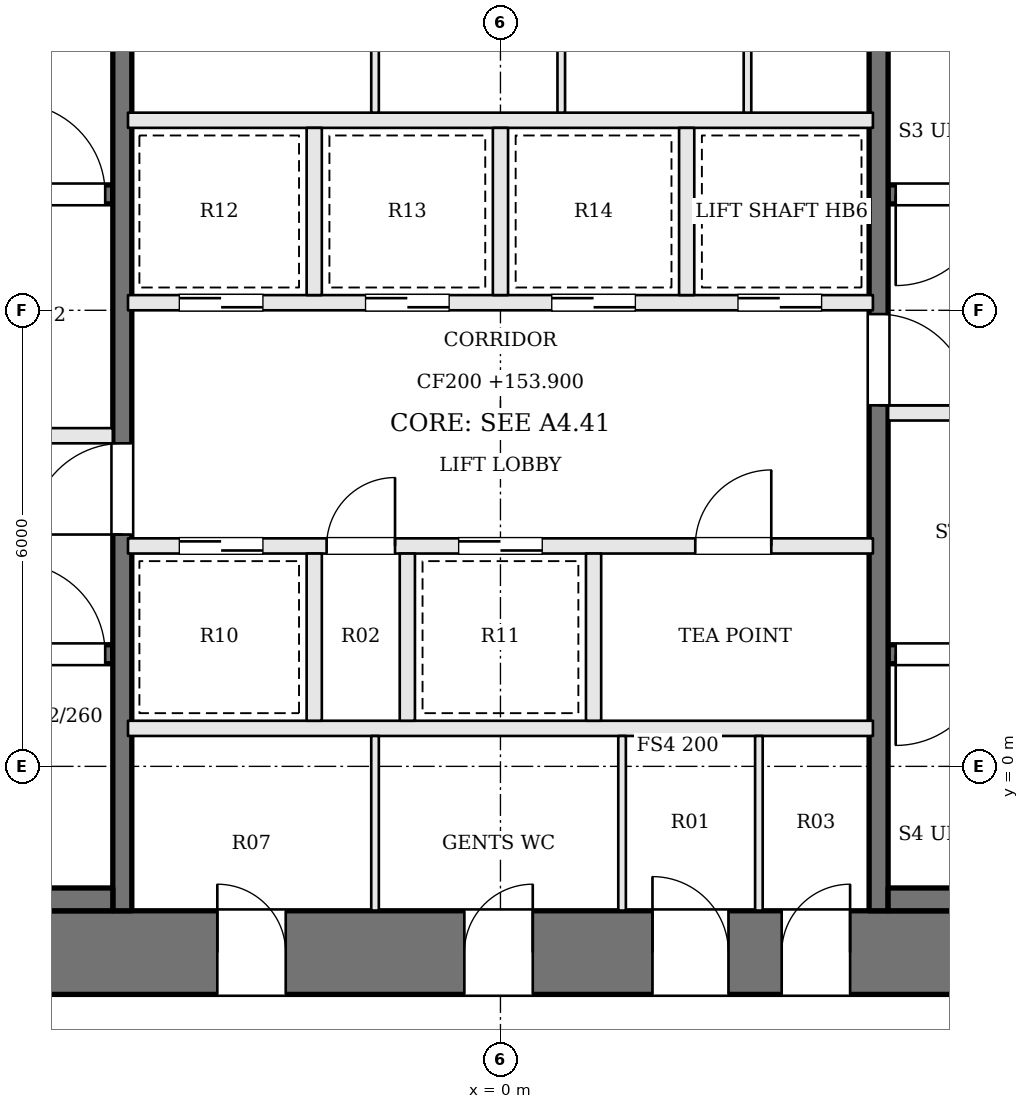
"""IFC4 building model, lengths in metres.
Left out: names, types, materials, properties, quantities, classifications, styles, units other than length and angle.
Written with IfcOpenShell. Run it as: python <this file> out.ifc"""

import sys

from ifc_helpers import new_model, si_unit, direction, frame, frame_2d, origin, place, context, subcontext, project, spatial, rectangle, extrude, element, fill, save


model = new_model("IFC4")
c1 = context("Model", 3, precision=1e-05, world=origin(), true_north=direction((0.0, 1.0)))
c2 = subcontext(c1, "Body", "Model", "MODEL_VIEW")
j1 = project(units=[si_unit("LENGTHUNIT", "METRE"), si_unit("PLANEANGLEUNIT", "RADIAN")], contexts=[c1])
p1 = place(None, origin())
s1 = spatial("IfcSite", under=j1, at=p1, CompositionType="ELEMENT")
p2 = place(p1, origin())
s2 = spatial("IfcBuilding", under=s1, at=p2, CompositionType="ELEMENT")
p3 = place(p2, frame((0.0, 0.0, 153.9)))
s3 = spatial("IfcBuildingStorey", under=s2, at=p3, CompositionType="ELEMENT", Elevation=153.9)
p4 = place(p3, frame((-13.0, -2.45, 0.0), z_axis=(0.0, 0.0, 1.0), x_axis=(1.0, 0.0, 0.0)))
e1 = element("IfcWall", 1, at=p4, inside=s3, PredefinedType="SHEAR", context=c2, shape_type="SweptSolid", body=[
    extrude(rectangle(XDim=26.0, YDim=1.1, at=frame_2d((13.0, 0.0))), origin(), (0.0, 0.0, 1.0), 3.9),
])
p5 = place(p4, frame((9.275, 0.0, 0.0)))
e2 = element("IfcOpeningElement", 2, at=p5, cuts=e1, PredefinedType="OPENING", context=c2, shape_type="SweptSolid", body=[
    extrude(rectangle(XDim=0.9, YDim=2.1, at=frame_2d((0.45, 1.05))), frame((0.0, 0.56, 0.0), z_axis=(0.0, -1.0, 0.0), x_axis=(1.0, 0.0, 0.0)), (0.0, 0.0, 1.0), 1.12),
])
p6 = place(p4, frame((12.525, 0.0, 0.0)))
e3 = element("IfcOpeningElement", 3, at=p6, cuts=e1, PredefinedType="OPENING", context=c2, shape_type="SweptSolid", body=[
    extrude(rectangle(XDim=0.9, YDim=2.1, at=frame_2d((0.45, 1.05))), frame((0.0, 0.56, 0.0), z_axis=(0.0, -1.0, 0.0), x_axis=(1.0, 0.0, 0.0)), (0.0, 0.0, 1.0), 1.12),
])
p7 = place(p4, frame((15.0, 0.0, 0.0)))
e4 = element("IfcOpeningElement", 4, at=p7, cuts=e1, PredefinedType="OPENING", context=c2, shape_type="SweptSolid", body=[
    extrude(rectangle(XDim=1.0, YDim=2.1, at=frame_2d((0.5, 1.05))), frame((0.0, 0.56, 0.0), z_axis=(0.0, -1.0, 0.0), x_axis=(1.0, 0.0, 0.0)), (0.0, 0.0, 1.0), 1.12),
])
p8 = place(p4, frame((16.7, 0.0, 0.0)))
e5 = element("IfcOpeningElement", 5, at=p8, cuts=e1, PredefinedType="OPENING", context=c2, shape_type="SweptSolid", body=[
    extrude(rectangle(XDim=0.9, YDim=2.1, at=frame_2d((0.45, 1.05))), frame((0.0, 0.56, 0.0), z_axis=(0.0, -1.0, 0.0), x_axis=(1.0, 0.0, 0.0)), (0.0, 0.0, 1.0), 1.12),
])
p9 = place(p3, frame((-11.9, 1.475, 0.0), z_axis=(0.0, 0.0, 1.0), x_axis=(1.0, 0.0, 0.0)))
e6 = element("IfcWall", 6, at=p9, inside=s3, PredefinedType="SOLIDWALL", context=c2, shape_type="SweptSolid", body=[
    extrude(rectangle(XDim=6.8, YDim=0.25, at=frame_2d((3.4, 0.0))), origin(), (0.0, 0.0, 1.0), 3.7),
])
p10 = place(p9, frame((5.5, 0.0, 0.0)))
e7 = element("IfcOpeningElement", 7, at=p10, cuts=e6, PredefinedType="OPENING", context=c2, shape_type="SweptSolid", body=[
    extrude(rectangle(XDim=1.2, YDim=2.1, at=frame_2d((0.6, 1.05))), frame((0.0, 0.135, 0.0), z_axis=(0.0, -1.0, 0.0), x_axis=(1.0, 0.0, 0.0)), (0.0, 0.0, 1.0), 0.27),
])
p11 = place(p3, frame((11.9, 7.525, 0.0), z_axis=(0.0, 0.0, 1.0), x_axis=(-1.0, 0.0, 0.0)))
e8 = element("IfcWall", 8, at=p11, inside=s3, PredefinedType="SOLIDWALL", context=c2, shape_type="SweptSolid", body=[
    extrude(rectangle(XDim=6.8, YDim=0.25, at=frame_2d((3.4, 0.0))), origin(), (0.0, 0.0, 1.0), 3.7),
])
p12 = place(p11, frame((5.5, 0.0, 0.0)))
e9 = element("IfcOpeningElement", 9, at=p12, cuts=e8, PredefinedType="OPENING", context=c2, shape_type="SweptSolid", body=[
    extrude(rectangle(XDim=1.2, YDim=2.1, at=frame_2d((0.6, 1.05))), frame((0.0, 0.135, 0.0), z_axis=(0.0, -1.0, 0.0), x_axis=(1.0, 0.0, 0.0)), (0.0, 0.0, 1.0), 0.27),
])
p13 = place(p3, frame((-11.9, 4.35, 0.0), z_axis=(0.0, 0.0, 1.0), x_axis=(1.0, 0.0, 0.0)))
e10 = element("IfcWall", 10, at=p13, inside=s3, PredefinedType="SOLIDWALL", context=c2, shape_type="SweptSolid", body=[
    extrude(rectangle(XDim=6.8, YDim=0.2, at=frame_2d((3.4, 0.0))), origin(), (0.0, 0.0, 1.0), 3.7),
])
p14 = place(p13, frame((4.1, 0.0, 0.0)))
e11 = element("IfcOpeningElement", 11, at=p14, cuts=e10, PredefinedType="OPENING", context=c2, shape_type="SweptSolid", body=[
    extrude(rectangle(XDim=1.2, YDim=2.1, at=frame_2d((0.6, 1.05))), frame((0.0, 0.11, 0.0), z_axis=(0.0, -1.0, 0.0), x_axis=(1.0, 0.0, 0.0)), (0.0, 0.0, 1.0), 0.22),
])
p15 = place(p13, frame((0.8, 0.0, 0.0)))
e12 = element("IfcOpeningElement", 12, at=p15, cuts=e10, PredefinedType="OPENING", context=c2, shape_type="SweptSolid", body=[
    extrude(rectangle(XDim=1.2, YDim=2.1, at=frame_2d((0.6, 1.05))), frame((0.0, 0.11, 0.0), z_axis=(0.0, -1.0, 0.0), x_axis=(1.0, 0.0, 0.0)), (0.0, 0.0, 1.0), 0.22),
])
p16 = place(p3, frame((11.9, 4.65, 0.0), z_axis=(0.0, 0.0, 1.0), x_axis=(-1.0, 0.0, 0.0)))
e13 = element("IfcWall", 13, at=p16, inside=s3, PredefinedType="SOLIDWALL", context=c2, shape_type="SweptSolid", body=[
    extrude(rectangle(XDim=6.8, YDim=0.2, at=frame_2d((3.4, 0.0))), origin(), (0.0, 0.0, 1.0), 3.7),
])
p17 = place(p16, frame((4.1, 0.0, 0.0)))
e14 = element("IfcOpeningElement", 14, at=p17, cuts=e13, PredefinedType="OPENING", context=c2, shape_type="SweptSolid", body=[
    extrude(rectangle(XDim=1.2, YDim=2.1, at=frame_2d((0.6, 1.05))), frame((0.0, 0.11, 0.0), z_axis=(0.0, -1.0, 0.0), x_axis=(1.0, 0.0, 0.0)), (0.0, 0.0, 1.0), 0.22),
])
p18 = place(p16, frame((0.8, 0.0, 0.0)))
e15 = element("IfcOpeningElement", 15, at=p18, cuts=e13, PredefinedType="OPENING", context=c2, shape_type="SweptSolid", body=[
    extrude(rectangle(XDim=1.2, YDim=2.1, at=frame_2d((0.6, 1.05))), frame((0.0, 0.11, 0.0), z_axis=(0.0, -1.0, 0.0), x_axis=(1.0, 0.0, 0.0)), (0.0, 0.0, 1.0), 0.22),
])
p19 = place(p3, frame((-11.9, 7.525, 0.0), z_axis=(0.0, 0.0, 1.0), x_axis=(1.0, 0.0, 0.0)))
e16 = element("IfcWall", 16, at=p19, inside=s3, PredefinedType="SOLIDWALL", context=c2, shape_type="SweptSolid", body=[
    extrude(rectangle(XDim=6.8, YDim=0.25, at=frame_2d((3.4, 0.0))), origin(), (0.0, 0.0, 1.0), 3.7),
])
p20 = place(p19, frame((5.5, 0.0, 0.0)))
e17 = element("IfcOpeningElement", 17, at=p20, cuts=e16, PredefinedType="OPENING", context=c2, shape_type="SweptSolid", body=[
    extrude(rectangle(XDim=1.2, YDim=2.1, at=frame_2d((0.6, 1.05))), frame((0.0, 0.135, 0.0), z_axis=(0.0, -1.0, 0.0), x_axis=(1.0, 0.0, 0.0)), (0.0, 0.0, 1.0), 0.27),
])
p21 = place(p3, frame((11.9, 1.475, 0.0), z_axis=(0.0, 0.0, 1.0), x_axis=(-1.0, 0.0, 0.0)))
e18 = element("IfcWall", 18, at=p21, inside=s3, PredefinedType="SOLIDWALL", context=c2, shape_type="SweptSolid", body=[
    extrude(rectangle(XDim=6.8, YDim=0.25, at=frame_2d((3.4, 0.0))), origin(), (0.0, 0.0, 1.0), 3.7),
])
p22 = place(p21, frame((5.5, 0.0, 0.0)))
e19 = element("IfcOpeningElement", 19, at=p22, cuts=e18, PredefinedType="OPENING", context=c2, shape_type="SweptSolid", body=[
    extrude(rectangle(XDim=1.2, YDim=2.1, at=frame_2d((0.6, 1.05))), frame((0.0, 0.135, 0.0), z_axis=(0.0, -1.0, 0.0), x_axis=(1.0, 0.0, 0.0)), (0.0, 0.0, 1.0), 0.27),
])
p23 = place(p3, frame((-4.975, -1.9, 0.0), z_axis=(0.0, 0.0, 1.0), x_axis=(0.0, 1.0, 0.0)))
e20 = element("IfcWall", 20, at=p23, inside=s3, PredefinedType="SOLIDWALL", context=c2, shape_type="SweptSolid", body=[
    extrude(rectangle(XDim=12.8, YDim=0.25, at=frame_2d((6.4, 0.0))), origin(), (0.0, 0.0, 1.0), 3.7),
])
p24 = place(p23, frame((4.95, 0.0, 0.0)))
e21 = element("IfcOpeningElement", 21, at=p24, cuts=e20, PredefinedType="OPENING", context=c2, shape_type="SweptSolid", body=[
    extrude(rectangle(XDim=1.2, YDim=2.1, at=frame_2d((0.6, 1.05))), frame((0.0, 0.135, 0.0), z_axis=(0.0, -1.0, 0.0), x_axis=(1.0, 0.0, 0.0)), (0.0, 0.0, 1.0), 0.27),
])
p25 = place(p3, frame((4.975, 10.9, 0.0), z_axis=(0.0, 0.0, 1.0), x_axis=(0.0, -1.0, 0.0)))
e22 = element("IfcWall", 22, at=p25, inside=s3, PredefinedType="SOLIDWALL", context=c2, shape_type="SweptSolid", body=[
    extrude(rectangle(XDim=12.8, YDim=0.25, at=frame_2d((6.4, 0.0))), origin(), (0.0, 0.0, 1.0), 3.7),
])
p26 = place(p25, frame((4.95, 0.0, 0.0)))
e23 = element("IfcOpeningElement", 23, at=p26, cuts=e22, PredefinedType="OPENING", context=c2, shape_type="SweptSolid", body=[
    extrude(rectangle(XDim=1.2, YDim=2.1, at=frame_2d((0.6, 1.05))), frame((0.0, 0.135, 0.0), z_axis=(0.0, -1.0, 0.0), x_axis=(1.0, 0.0, 0.0)), (0.0, 0.0, 1.0), 0.27),
])
for number, where, z_axis, x_axis in (
    (24, (-11.9, -1.75, 0.0), (0.0, 0.0, 1.0), (1.0, 0.0, 0.0)),
    (25, (11.9, -1.75, 0.0), (0.0, 0.0, 1.0), (-1.0, 0.0, 0.0)),
):
    element("IfcWall", number, at=place(p3, frame(where, z_axis=z_axis, x_axis=x_axis)), inside=s3, PredefinedType="SOLIDWALL", context=c2, shape_type="SweptSolid", body=[
        extrude(rectangle(XDim=6.8, YDim=0.3, at=frame_2d((3.4, 0.0))), origin(), (0.0, 0.0, 1.0), 3.7),
    ])
p27 = place(p3, frame((-4.9, 0.5, 0.0), z_axis=(0.0, 0.0, 1.0), x_axis=(1.0, 0.0, 0.0)))
e26 = element("IfcWall", 26, at=p27, inside=s3, PredefinedType="SOLIDWALL", context=c2, shape_type="SweptSolid", body=[
    extrude(rectangle(XDim=9.8, YDim=0.2, at=frame_2d((4.9, 0.0))), origin(), (0.0, 0.0, 1.0), 3.7),
])
p28 = place(p3, frame((-4.9, 2.9, 0.0), z_axis=(0.0, 0.0, 1.0), x_axis=(1.0, 0.0, 0.0)))
e27 = element("IfcWall", 27, at=p28, inside=s3, PredefinedType="SOLIDWALL", context=c2, shape_type="SweptSolid", body=[
    extrude(rectangle(XDim=9.8, YDim=0.2, at=frame_2d((4.9, 0.0))), origin(), (0.0, 0.0, 1.0), 3.7),
])
p29 = place(p28, frame((0.675, 0.0, 0.0)))
e28 = element("IfcOpeningElement", 28, at=p29, cuts=e27, PredefinedType="OPENING", context=c2, shape_type="SweptSolid", body=[
    extrude(rectangle(XDim=1.1, YDim=2.1, at=frame_2d((0.55, 1.05))), frame((0.0, 0.11, 0.0), z_axis=(0.0, -1.0, 0.0), x_axis=(1.0, 0.0, 0.0)), (0.0, 0.0, 1.0), 0.22),
])
p30 = place(p28, frame((2.613, 0.0, 0.0)))
e29 = element("IfcOpeningElement", 29, at=p30, cuts=e27, PredefinedType="OPENING", context=c2, shape_type="SweptSolid", body=[
    extrude(rectangle(XDim=0.9, YDim=2.1, at=frame_2d((0.45, 1.05))), frame((0.0, 0.11, 0.0), z_axis=(0.0, -1.0, 0.0), x_axis=(1.0, 0.0, 0.0)), (0.0, 0.0, 1.0), 0.22),
])
p31 = place(p28, frame((4.35, 0.0, 0.0)))
e30 = element("IfcOpeningElement", 30, at=p31, cuts=e27, PredefinedType="OPENING", context=c2, shape_type="SweptSolid", body=[
    extrude(rectangle(XDim=1.1, YDim=2.1, at=frame_2d((0.55, 1.05))), frame((0.0, 0.11, 0.0), z_axis=(0.0, -1.0, 0.0), x_axis=(1.0, 0.0, 0.0)), (0.0, 0.0, 1.0), 0.22),
])
p32 = place(p28, frame((7.463, 0.0, 0.0)))
e31 = element("IfcOpeningElement", 31, at=p32, cuts=e27, PredefinedType="OPENING", context=c2, shape_type="SweptSolid", body=[
    extrude(rectangle(XDim=1.0, YDim=2.1, at=frame_2d((0.5, 1.05))), frame((0.0, 0.11, 0.0), z_axis=(0.0, -1.0, 0.0), x_axis=(1.0, 0.0, 0.0)), (0.0, 0.0, 1.0), 0.22),
])
p33 = place(p3, frame((-4.9, 6.1, 0.0), z_axis=(0.0, 0.0, 1.0), x_axis=(1.0, 0.0, 0.0)))
e32 = element("IfcWall", 32, at=p33, inside=s3, PredefinedType="SOLIDWALL", context=c2, shape_type="SweptSolid", body=[
    extrude(rectangle(XDim=9.8, YDim=0.2, at=frame_2d((4.9, 0.0))), origin(), (0.0, 0.0, 1.0), 3.7),
])
p34 = place(p33, frame((0.675, 0.0, 0.0)))
e33 = element("IfcOpeningElement", 33, at=p34, cuts=e32, PredefinedType="OPENING", context=c2, shape_type="SweptSolid", body=[
    extrude(rectangle(XDim=1.1, YDim=2.1, at=frame_2d((0.55, 1.05))), frame((0.0, 0.11, 0.0), z_axis=(0.0, -1.0, 0.0), x_axis=(1.0, 0.0, 0.0)), (0.0, 0.0, 1.0), 0.22),
])
p35 = place(p33, frame((3.125, 0.0, 0.0)))
e34 = element("IfcOpeningElement", 34, at=p35, cuts=e32, PredefinedType="OPENING", context=c2, shape_type="SweptSolid", body=[
    extrude(rectangle(XDim=1.1, YDim=2.1, at=frame_2d((0.55, 1.05))), frame((0.0, 0.11, 0.0), z_axis=(0.0, -1.0, 0.0), x_axis=(1.0, 0.0, 0.0)), (0.0, 0.0, 1.0), 0.22),
])
p36 = place(p33, frame((5.575, 0.0, 0.0)))
e35 = element("IfcOpeningElement", 35, at=p36, cuts=e32, PredefinedType="OPENING", context=c2, shape_type="SweptSolid", body=[
    extrude(rectangle(XDim=1.1, YDim=2.1, at=frame_2d((0.55, 1.05))), frame((0.0, 0.11, 0.0), z_axis=(0.0, -1.0, 0.0), x_axis=(1.0, 0.0, 0.0)), (0.0, 0.0, 1.0), 0.22),
])
p37 = place(p33, frame((8.025, 0.0, 0.0)))
e36 = element("IfcOpeningElement", 36, at=p37, cuts=e32, PredefinedType="OPENING", context=c2, shape_type="SweptSolid", body=[
    extrude(rectangle(XDim=1.1, YDim=2.1, at=frame_2d((0.55, 1.05))), frame((0.0, 0.11, 0.0), z_axis=(0.0, -1.0, 0.0), x_axis=(1.0, 0.0, 0.0)), (0.0, 0.0, 1.0), 0.22),
])
p38 = place(p3, frame((-4.9, 8.5, 0.0), z_axis=(0.0, 0.0, 1.0), x_axis=(1.0, 0.0, 0.0)))
e37 = element("IfcWall", 37, at=p38, inside=s3, PredefinedType="SOLIDWALL", context=c2, shape_type="SweptSolid", body=[
    extrude(rectangle(XDim=9.8, YDim=0.2, at=frame_2d((4.9, 0.0))), origin(), (0.0, 0.0, 1.0), 3.7),
])
for number, where, z_axis, x_axis in (
    (38, (-2.45, 0.6, 0.0), (0.0, 0.0, 1.0), (0.0, 1.0, 0.0)),
    (39, (-1.225, 0.6, 0.0), (0.0, 0.0, 1.0), (0.0, 1.0, 0.0)),
    (40, (1.225, 0.6, 0.0), (0.0, 0.0, 1.0), (0.0, 1.0, 0.0)),
    (41, (-2.45, 6.2, 0.0), (0.0, 0.0, 1.0), (0.0, 1.0, 0.0)),
    (42, (0.0, 6.2, 0.0), (0.0, 0.0, 1.0), (0.0, 1.0, 0.0)),
    (43, (2.45, 6.2, 0.0), (0.0, 0.0, 1.0), (0.0, 1.0, 0.0)),
):
    element("IfcWall", number, at=place(p3, frame(where, z_axis=z_axis, x_axis=x_axis)), inside=s3, PredefinedType="SOLIDWALL", context=c2, shape_type="SweptSolid", body=[
        extrude(rectangle(XDim=2.2, YDim=0.2, at=frame_2d((1.1, 0.0))), origin(), (0.0, 0.0, 1.0), 3.7),
    ])
for number, where, z_axis, x_axis in (
    (44, (-1.65, -1.9, 0.0), (0.0, 0.0, 1.0), (0.0, 1.0, 0.0)),
    (45, (1.6, -1.9, 0.0), (0.0, 0.0, 1.0), (0.0, 1.0, 0.0)),
    (46, (3.4, -1.9, 0.0), (0.0, 0.0, 1.0), (0.0, 1.0, 0.0)),
    (47, (-1.65, 8.6, 0.0), (0.0, 0.0, 1.0), (0.0, 1.0, 0.0)),
    (48, (0.8, 8.6, 0.0), (0.0, 0.0, 1.0), (0.0, 1.0, 0.0)),
    (49, (3.25, 8.6, 0.0), (0.0, 0.0, 1.0), (0.0, 1.0, 0.0)),
):
    element("IfcWall", number, at=place(p3, frame(where, z_axis=z_axis, x_axis=x_axis)), inside=s3, PredefinedType="PARTITIONING", context=c2, shape_type="SweptSolid", body=[
        extrude(rectangle(XDim=2.3, YDim=0.1, at=frame_2d((1.15, 0.0))), origin(), (0.0, 0.0, 1.0), 3.7),
    ])
p39 = place(p24, origin())
e50 = element("IfcDoor", 50, at=p39, inside=s3, OperationType="SINGLE_SWING_LEFT", PredefinedType="DOOR", context=c2, shape_type="SweptSolid", body=[
    extrude(rectangle(XDim=1.2, YDim=2.1, at=frame_2d((0.6, 1.05))), frame((0.0, 0.025, 0.0), z_axis=(0.0, -1.0, 0.0), x_axis=(1.0, 0.0, 0.0)), (0.0, 0.0, 1.0), 0.05),
])
fill(e21, e50)
p40 = place(p26, origin())
e51 = element("IfcDoor", 51, at=p40, inside=s3, OperationType="SINGLE_SWING_RIGHT", PredefinedType="DOOR", context=c2, shape_type="SweptSolid", body=[
    extrude(rectangle(XDim=1.2, YDim=2.1, at=frame_2d((0.6, 1.05))), frame((0.0, 0.025, 0.0), z_axis=(0.0, -1.0, 0.0), x_axis=(1.0, 0.0, 0.0)), (0.0, 0.0, 1.0), 0.05),
])
fill(e23, e51)
p41 = place(p10, origin())
e52 = element("IfcDoor", 52, at=p41, inside=s3, OperationType="SINGLE_SWING_LEFT", PredefinedType="DOOR", context=c2, shape_type="SweptSolid", body=[
    extrude(rectangle(XDim=1.2, YDim=2.1, at=frame_2d((0.6, 1.05))), frame((0.0, 0.025, 0.0), z_axis=(0.0, -1.0, 0.0), x_axis=(1.0, 0.0, 0.0)), (0.0, 0.0, 1.0), 0.05),
])
fill(e7, e52)
p42 = place(p12, origin())
e53 = element("IfcDoor", 53, at=p42, inside=s3, OperationType="SINGLE_SWING_RIGHT", PredefinedType="DOOR", context=c2, shape_type="SweptSolid", body=[
    extrude(rectangle(XDim=1.2, YDim=2.1, at=frame_2d((0.6, 1.05))), frame((0.0, 0.025, 0.0), z_axis=(0.0, -1.0, 0.0), x_axis=(1.0, 0.0, 0.0)), (0.0, 0.0, 1.0), 0.05),
])
fill(e9, e53)
p43 = place(p20, origin())
e54 = element("IfcDoor", 54, at=p43, inside=s3, OperationType="SINGLE_SWING_LEFT", PredefinedType="DOOR", context=c2, shape_type="SweptSolid", body=[
    extrude(rectangle(XDim=1.2, YDim=2.1, at=frame_2d((0.6, 1.05))), frame((0.0, 0.025, 0.0), z_axis=(0.0, -1.0, 0.0), x_axis=(1.0, 0.0, 0.0)), (0.0, 0.0, 1.0), 0.05),
])
fill(e17, e54)
p44 = place(p22, origin())
e55 = element("IfcDoor", 55, at=p44, inside=s3, OperationType="SINGLE_SWING_RIGHT", PredefinedType="DOOR", context=c2, shape_type="SweptSolid", body=[
    extrude(rectangle(XDim=1.2, YDim=2.1, at=frame_2d((0.6, 1.05))), frame((0.0, 0.025, 0.0), z_axis=(0.0, -1.0, 0.0), x_axis=(1.0, 0.0, 0.0)), (0.0, 0.0, 1.0), 0.05),
])
fill(e19, e55)
p45 = place(p29, origin())
e56 = element("IfcDoor", 56, at=p45, inside=s3, OperationType="SLIDING_TO_RIGHT", PredefinedType="DOOR", context=c2, shape_type="SweptSolid", body=[
    extrude(rectangle(XDim=1.1, YDim=2.1, at=frame_2d((0.55, 1.05))), frame((0.0, 0.025, 0.0), z_axis=(0.0, -1.0, 0.0), x_axis=(1.0, 0.0, 0.0)), (0.0, 0.0, 1.0), 0.05),
])
fill(e28, e56)
p46 = place(p30, origin())
e57 = element("IfcDoor", 57, at=p46, inside=s3, OperationType="SINGLE_SWING_RIGHT", PredefinedType="DOOR", context=c2, shape_type="SweptSolid", body=[
    extrude(rectangle(XDim=0.9, YDim=2.1, at=frame_2d((0.45, 1.05))), frame((0.0, 0.025, 0.0), z_axis=(0.0, -1.0, 0.0), x_axis=(1.0, 0.0, 0.0)), (0.0, 0.0, 1.0), 0.05),
])
fill(e29, e57)
p47 = place(p31, origin())
e58 = element("IfcDoor", 58, at=p47, inside=s3, OperationType="SLIDING_TO_LEFT", PredefinedType="DOOR", context=c2, shape_type="SweptSolid", body=[
    extrude(rectangle(XDim=1.1, YDim=2.1, at=frame_2d((0.55, 1.05))), frame((0.0, 0.025, 0.0), z_axis=(0.0, -1.0, 0.0), x_axis=(1.0, 0.0, 0.0)), (0.0, 0.0, 1.0), 0.05),
])
fill(e30, e58)
p48 = place(p32, origin())
e59 = element("IfcDoor", 59, at=p48, inside=s3, OperationType="SINGLE_SWING_RIGHT", PredefinedType="DOOR", context=c2, shape_type="SweptSolid", body=[
    extrude(rectangle(XDim=1.0, YDim=2.1, at=frame_2d((0.5, 1.05))), frame((0.0, 0.025, 0.0), z_axis=(0.0, -1.0, 0.0), x_axis=(1.0, 0.0, 0.0)), (0.0, 0.0, 1.0), 0.05),
])
fill(e31, e59)
p49 = place(p34, origin())
e60 = element("IfcDoor", 60, at=p49, inside=s3, OperationType="SLIDING_TO_RIGHT", PredefinedType="DOOR", context=c2, shape_type="SweptSolid", body=[
    extrude(rectangle(XDim=1.1, YDim=2.1, at=frame_2d((0.55, 1.05))), frame((0.0, 0.025, 0.0), z_axis=(0.0, -1.0, 0.0), x_axis=(1.0, 0.0, 0.0)), (0.0, 0.0, 1.0), 0.05),
])
fill(e33, e60)
p50 = place(p35, origin())
e61 = element("IfcDoor", 61, at=p50, inside=s3, OperationType="SLIDING_TO_LEFT", PredefinedType="DOOR", context=c2, shape_type="SweptSolid", body=[
    extrude(rectangle(XDim=1.1, YDim=2.1, at=frame_2d((0.55, 1.05))), frame((0.0, 0.025, 0.0), z_axis=(0.0, -1.0, 0.0), x_axis=(1.0, 0.0, 0.0)), (0.0, 0.0, 1.0), 0.05),
])
fill(e34, e61)
p51 = place(p36, origin())
e62 = element("IfcDoor", 62, at=p51, inside=s3, OperationType="SLIDING_TO_RIGHT", PredefinedType="DOOR", context=c2, shape_type="SweptSolid", body=[
    extrude(rectangle(XDim=1.1, YDim=2.1, at=frame_2d((0.55, 1.05))), frame((0.0, 0.025, 0.0), z_axis=(0.0, -1.0, 0.0), x_axis=(1.0, 0.0, 0.0)), (0.0, 0.0, 1.0), 0.05),
])
fill(e35, e62)
p52 = place(p37, origin())
e63 = element("IfcDoor", 63, at=p52, inside=s3, OperationType="SLIDING_TO_LEFT", PredefinedType="DOOR", context=c2, shape_type="SweptSolid", body=[
    extrude(rectangle(XDim=1.1, YDim=2.1, at=frame_2d((0.55, 1.05))), frame((0.0, 0.025, 0.0), z_axis=(0.0, -1.0, 0.0), x_axis=(1.0, 0.0, 0.0)), (0.0, 0.0, 1.0), 0.05),
])
fill(e36, e63)
p53 = place(p5, origin())
e64 = element("IfcDoor", 64, at=p53, inside=s3, OperationType="SINGLE_SWING_LEFT", PredefinedType="DOOR", context=c2, shape_type="SweptSolid", body=[
    extrude(rectangle(XDim=0.9, YDim=2.1, at=frame_2d((0.45, 1.05))), frame((0.0, 0.025, 0.0), z_axis=(0.0, -1.0, 0.0), x_axis=(1.0, 0.0, 0.0)), (0.0, 0.0, 1.0), 0.05),
])
fill(e2, e64)
p54 = place(p6, origin())
e65 = element("IfcDoor", 65, at=p54, inside=s3, OperationType="SINGLE_SWING_RIGHT", PredefinedType="DOOR", context=c2, shape_type="SweptSolid", body=[
    extrude(rectangle(XDim=0.9, YDim=2.1, at=frame_2d((0.45, 1.05))), frame((0.0, 0.025, 0.0), z_axis=(0.0, -1.0, 0.0), x_axis=(1.0, 0.0, 0.0)), (0.0, 0.0, 1.0), 0.05),
])
fill(e3, e65)
p55 = place(p7, origin())
e66 = element("IfcDoor", 66, at=p55, inside=s3, OperationType="SINGLE_SWING_LEFT", PredefinedType="DOOR", context=c2, shape_type="SweptSolid", body=[
    extrude(rectangle(XDim=1.0, YDim=2.1, at=frame_2d((0.5, 1.05))), frame((0.0, 0.025, 0.0), z_axis=(0.0, -1.0, 0.0), x_axis=(1.0, 0.0, 0.0)), (0.0, 0.0, 1.0), 0.05),
])
fill(e4, e66)
p56 = place(p8, origin())
e67 = element("IfcDoor", 67, at=p56, inside=s3, OperationType="SINGLE_SWING_RIGHT", PredefinedType="DOOR", context=c2, shape_type="SweptSolid", body=[
    extrude(rectangle(XDim=0.9, YDim=2.1, at=frame_2d((0.45, 1.05))), frame((0.0, 0.025, 0.0), z_axis=(0.0, -1.0, 0.0), x_axis=(1.0, 0.0, 0.0)), (0.0, 0.0, 1.0), 0.05),
])
fill(e5, e67)
save(model, sys.argv[1])
